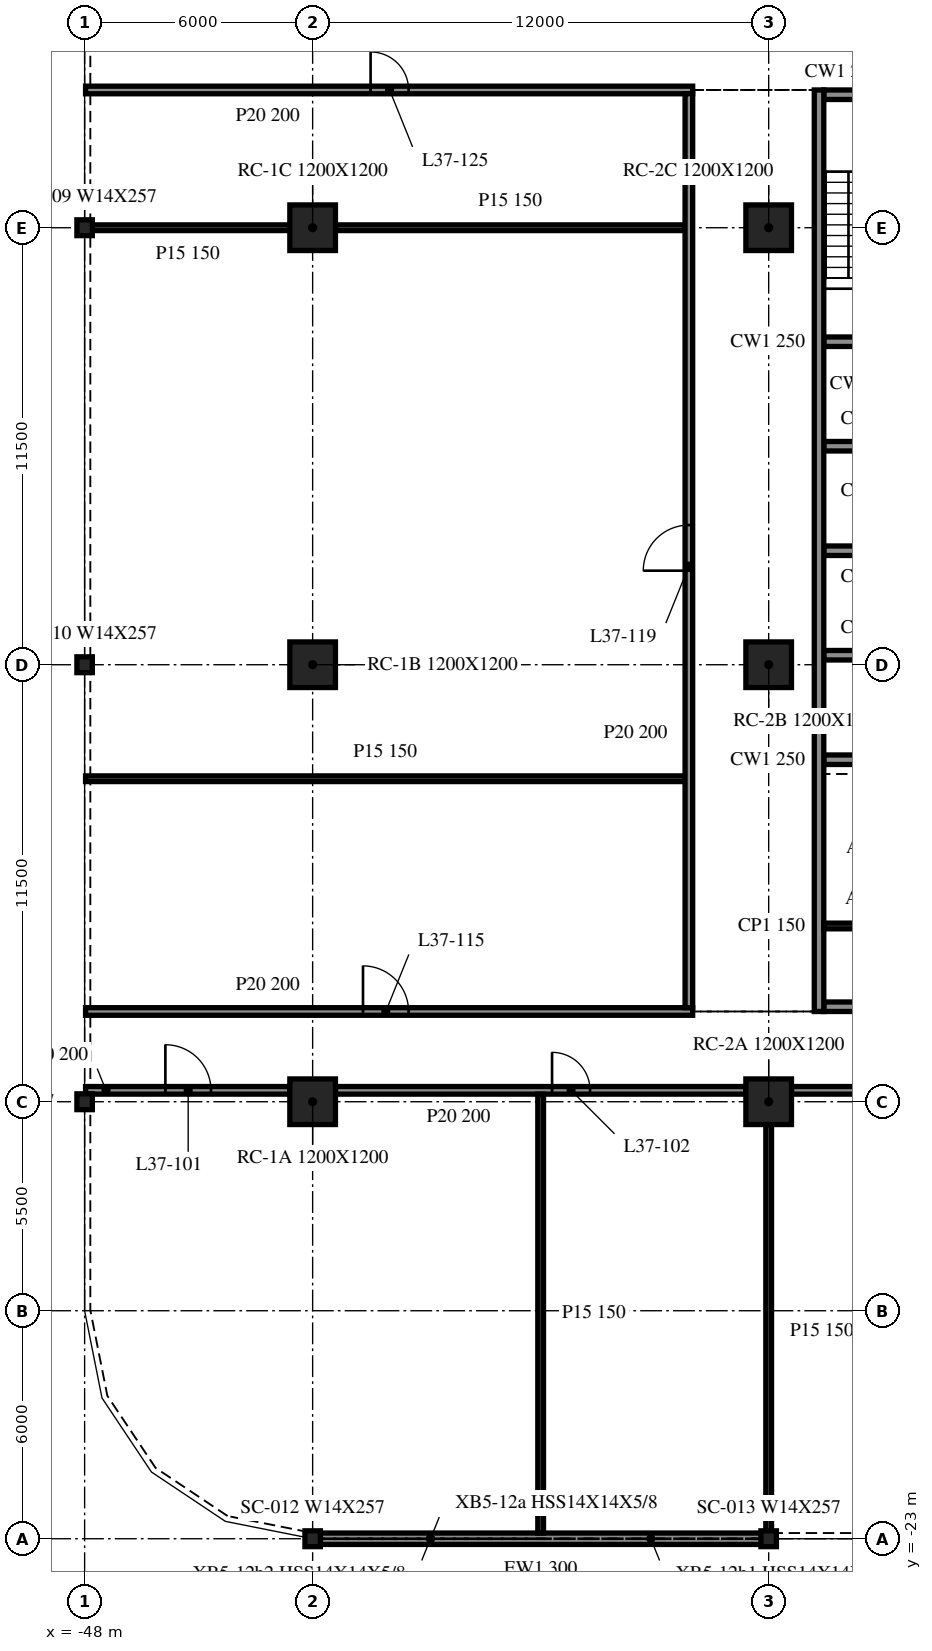
"""IFC4 building model, lengths in metres.
Left out: names, types, materials, properties, quantities, classifications, styles, units other than length and angle.
Written with IfcOpenShell. Run it as: python <this file> out.ifc"""

import sys

from ifc_helpers import new_model, si_unit, direction, frame, frame_2d, origin, origin_2d, place, context, subcontext, project, spatial, rectangle, i_section, extrude, element, fill, save


model = new_model("IFC4")
c1 = context("Model", 3, precision=1e-05, world=origin(), true_north=direction((0.0, 1.0)))
c2 = subcontext(c1, "Body", "Model", "MODEL_VIEW")
j1 = project(units=[si_unit("LENGTHUNIT", "METRE"), si_unit("PLANEANGLEUNIT", "RADIAN")], contexts=[c1])
p1 = place(None, origin())
s1 = spatial("IfcSite", under=j1, at=p1, CompositionType="ELEMENT")
p2 = place(p1, origin())
s2 = spatial("IfcBuilding", under=s1, at=p2, CompositionType="ELEMENT")
p3 = place(p2, frame((0.0, 0.0, 159.2)))
s3 = spatial("IfcBuildingStorey", under=s2, at=p3, CompositionType="ELEMENT", Elevation=159.2)
for number, where, z_axis, x_axis in (
    (1, (-42.0, -11.5, -0.34), (0.0, 0.0, 1.0), (1.0, 0.0, 0.0)),
    (2, (-42.0, 0.0, -0.34), (0.0, 0.0, 1.0), (1.0, 0.0, 0.0)),
    (3, (-42.0, 11.5, -0.34), (0.0, 0.0, 1.0), (1.0, 0.0, 0.0)),
    (4, (-30.0, -11.5, -0.34), (0.0, 0.0, 1.0), (1.0, 0.0, 0.0)),
    (5, (-30.0, 0.0, -0.34), (0.0, 0.0, 1.0), (1.0, 0.0, 0.0)),
    (6, (-30.0, 11.5, -0.34), (0.0, 0.0, 1.0), (1.0, 0.0, 0.0)),
):
    element("IfcColumn", number, at=place(p3, frame(where, z_axis=z_axis, x_axis=x_axis)), inside=s3, PredefinedType="COLUMN", context=c2, shape_type="SweptSolid", body=[
        extrude(rectangle(XDim=1.2, YDim=1.2, at=origin_2d()), origin(), (0.0, 0.0, 1.0), 3.8),
    ])
for number, where, z_axis, x_axis in (
    (7, (-48.0, 11.5, -0.34), (0.0, 0.0, 1.0), (1.0, 0.0, 0.0)),
    (8, (-48.0, 0.0, -0.34), (0.0, 0.0, 1.0), (1.0, 0.0, 0.0)),
    (9, (-48.0, -11.5, -0.34), (0.0, 0.0, 1.0), (1.0, 0.0, 0.0)),
    (10, (-42.0, -23.0, -0.34), (0.0, 0.0, 1.0), (1.0, 0.0, 0.0)),
    (11, (-30.0, -23.0, -0.34), (0.0, 0.0, 1.0), (1.0, 0.0, 0.0)),
):
    element("IfcColumn", number, at=place(p3, frame(where, z_axis=z_axis, x_axis=x_axis)), inside=s3, PredefinedType="COLUMN", context=c2, shape_type="SweptSolid", body=[
        extrude(i_section(OverallWidth=0.406, OverallDepth=0.417, WebThickness=0.03, FlangeThickness=0.048, at=origin_2d()), origin(), (0.0, 0.0, 1.0), 3.8),
    ])
p4 = place(p3, frame((-41.985, -23.0, 0.0), z_axis=(0.0, 0.0, 1.0), x_axis=(1.0, 0.0, 0.0)))
e12 = element("IfcWall", 12, at=p4, inside=s3, PredefinedType="NOTDEFINED", context=c2, shape_type="SweptSolid", body=[
    extrude(rectangle(XDim=11.97, YDim=0.3, at=frame_2d((5.985, 0.0))), origin(), (0.0, 0.0, 1.0), 2.782),
])
p5 = place(p3, frame((-28.675, 15.125, 0.0), z_axis=(0.0, 0.0, 1.0), x_axis=(0.0, -1.0, 0.0)))
e13 = element("IfcWall", 13, at=p5, inside=s3, PredefinedType="SOLIDWALL", context=c2, shape_type="SweptSolid", body=[
    extrude(rectangle(XDim=24.25, YDim=0.25, at=frame_2d((12.125, 0.0))), origin(), (0.0, 0.0, 1.0), 3.46),
])
p6 = place(p3, frame((-19.45, -9.0, 0.0), z_axis=(0.0, 0.0, 1.0), x_axis=(-1.0, 0.0, 0.0)))
e14 = element("IfcWall", 14, at=p6, inside=s3, PredefinedType="SOLIDWALL", context=c2, shape_type="SweptSolid", body=[
    extrude(rectangle(XDim=9.1, YDim=0.25, at=frame_2d((4.55, 0.0))), origin(), (0.0, 0.0, 1.0), 3.46),
])
p7 = place(p6, frame((3.65, 0.0, 0.0)))
e15 = element("IfcOpeningElement", 15, at=p7, cuts=e14, PredefinedType="OPENING", context=c2, shape_type="SweptSolid", body=[
    extrude(rectangle(XDim=1.8, YDim=2.1, at=frame_2d((0.9, 1.05))), frame((0.0, 0.135, 0.0), z_axis=(0.0, -1.0, 0.0), x_axis=(1.0, 0.0, 0.0)), (0.0, 0.0, 1.0), 0.27),
])
p8 = place(p3, frame((-28.55, 15.0, 0.0), z_axis=(0.0, 0.0, 1.0), x_axis=(1.0, 0.0, 0.0)))
e16 = element("IfcWall", 16, at=p8, inside=s3, PredefinedType="SOLIDWALL", context=c2, shape_type="SweptSolid", body=[
    extrude(rectangle(XDim=9.1, YDim=0.25, at=frame_2d((4.55, 0.0))), origin(), (0.0, 0.0, 1.0), 3.46),
])
p9 = place(p8, frame((3.65, 0.0, 0.0)))
e17 = element("IfcOpeningElement", 17, at=p9, cuts=e16, PredefinedType="OPENING", context=c2, shape_type="SweptSolid", body=[
    extrude(rectangle(XDim=1.8, YDim=2.1, at=frame_2d((0.9, 1.05))), frame((0.0, 0.135, 0.0), z_axis=(0.0, -1.0, 0.0), x_axis=(1.0, 0.0, 0.0)), (0.0, 0.0, 1.0), 0.27),
])
for number, where, z_axis, x_axis in (
    (18, (-28.55, -2.5, 0.0), (0.0, 0.0, 1.0), (1.0, 0.0, 0.0)),
    (19, (-28.55, 0.25, 0.0), (0.0, 0.0, 1.0), (1.0, 0.0, 0.0)),
    (20, (-28.55, 3.0, 0.0), (0.0, 0.0, 1.0), (1.0, 0.0, 0.0)),
    (21, (-28.55, 5.75, 0.0), (0.0, 0.0, 1.0), (1.0, 0.0, 0.0)),
    (22, (-28.55, 8.5, 0.0), (0.0, 0.0, 1.0), (1.0, 0.0, 0.0)),
):
    element("IfcWall", number, at=place(p3, frame(where, z_axis=z_axis, x_axis=x_axis)), inside=s3, PredefinedType="SOLIDWALL", context=c2, shape_type="SweptSolid", body=[
        extrude(rectangle(XDim=2.85, YDim=0.25, at=frame_2d((1.425, 0.0))), origin(), (0.0, 0.0, 1.0), 3.46),
    ])
p10 = place(p3, frame((-28.55, -6.875, 0.0), z_axis=(0.0, 0.0, 1.0), x_axis=(1.0, 0.0, 0.0)))
e23 = element("IfcWall", 23, at=p10, inside=s3, PredefinedType="PARTITIONING", context=c2, shape_type="SweptSolid", body=[
    extrude(rectangle(XDim=2.85, YDim=0.15, at=frame_2d((1.425, 0.0))), origin(), (0.0, 0.0, 1.0), 3.46),
])
p11 = place(p3, frame((-47.975, -11.2, 0.0), z_axis=(0.0, 0.0, 1.0), x_axis=(1.0, 0.0, 0.0)))
e24 = element("IfcWall", 24, at=p11, inside=s3, PredefinedType="PARTITIONING", context=c2, shape_type="SweptSolid", body=[
    extrude(rectangle(XDim=5.375, YDim=0.2, at=frame_2d((2.688, 0.0))), origin(), (0.0, 0.0, 1.0), 3.46),
])
p12 = place(p11, frame((2.1, 0.0, 0.0)))
e25 = element("IfcOpeningElement", 25, at=p12, cuts=e24, PredefinedType="OPENING", context=c2, shape_type="SweptSolid", body=[
    extrude(rectangle(XDim=1.2, YDim=2.1, at=frame_2d((0.6, 1.05))), frame((0.0, 0.11, 0.0), z_axis=(0.0, -1.0, 0.0), x_axis=(1.0, 0.0, 0.0)), (0.0, 0.0, 1.0), 0.22),
])
p13 = place(p3, frame((-41.4, -11.2, 0.0), z_axis=(0.0, 0.0, 1.0), x_axis=(1.0, 0.0, 0.0)))
e26 = element("IfcWall", 26, at=p13, inside=s3, PredefinedType="PARTITIONING", context=c2, shape_type="SweptSolid", body=[
    extrude(rectangle(XDim=10.8, YDim=0.2, at=frame_2d((5.4, 0.0))), origin(), (0.0, 0.0, 1.0), 3.46),
])
p14 = place(p13, frame((5.7, 0.0, 0.0)))
e27 = element("IfcOpeningElement", 27, at=p14, cuts=e26, PredefinedType="OPENING", context=c2, shape_type="SweptSolid", body=[
    extrude(rectangle(XDim=1.0, YDim=2.1, at=frame_2d((0.5, 1.05))), frame((0.0, 0.11, 0.0), z_axis=(0.0, -1.0, 0.0), x_axis=(1.0, 0.0, 0.0)), (0.0, 0.0, 1.0), 0.22),
])
p15 = place(p3, frame((-29.4, -11.2, 0.0), z_axis=(0.0, 0.0, 1.0), x_axis=(1.0, 0.0, 0.0)))
e28 = element("IfcWall", 28, at=p15, inside=s3, PredefinedType="PARTITIONING", context=c2, shape_type="SweptSolid", body=[
    extrude(rectangle(XDim=10.8, YDim=0.2, at=frame_2d((5.4, 0.0))), origin(), (0.0, 0.0, 1.0), 3.46),
])
p16 = place(p15, frame((3.9, 0.0, 0.0)))
e29 = element("IfcOpeningElement", 29, at=p16, cuts=e28, PredefinedType="OPENING", context=c2, shape_type="SweptSolid", body=[
    extrude(rectangle(XDim=1.2, YDim=2.1, at=frame_2d((0.6, 1.05))), frame((0.0, 0.11, 0.0), z_axis=(0.0, -1.0, 0.0), x_axis=(1.0, 0.0, 0.0)), (0.0, 0.0, 1.0), 0.22),
])
p17 = place(p15, frame((5.7, 0.0, 0.0)))
e30 = element("IfcOpeningElement", 30, at=p17, cuts=e28, PredefinedType="OPENING", context=c2, shape_type="SweptSolid", body=[
    extrude(rectangle(XDim=1.2, YDim=2.1, at=frame_2d((0.6, 1.05))), frame((0.0, 0.11, 0.0), z_axis=(0.0, -1.0, 0.0), x_axis=(1.0, 0.0, 0.0)), (0.0, 0.0, 1.0), 0.22),
])
p18 = place(p15, frame((8.7, 0.0, 0.0)))
e31 = element("IfcOpeningElement", 31, at=p18, cuts=e28, PredefinedType="OPENING", context=c2, shape_type="SweptSolid", body=[
    extrude(rectangle(XDim=1.0, YDim=2.1, at=frame_2d((0.5, 1.05))), frame((0.0, 0.11, 0.0), z_axis=(0.0, -1.0, 0.0), x_axis=(1.0, 0.0, 0.0)), (0.0, 0.0, 1.0), 0.22),
])
p19 = place(p3, frame((-47.975, -9.125, 0.0), z_axis=(0.0, 0.0, 1.0), x_axis=(1.0, 0.0, 0.0)))
e32 = element("IfcWall", 32, at=p19, inside=s3, PredefinedType="PARTITIONING", context=c2, shape_type="SweptSolid", body=[
    extrude(rectangle(XDim=15.975, YDim=0.2, at=frame_2d((7.988, 0.0))), origin(), (0.0, 0.0, 1.0), 3.46),
])
p20 = place(p19, frame((7.3, 0.0, 0.0)))
e33 = element("IfcOpeningElement", 33, at=p20, cuts=e32, PredefinedType="OPENING", context=c2, shape_type="SweptSolid", body=[
    extrude(rectangle(XDim=1.2, YDim=2.1, at=frame_2d((0.6, 1.05))), frame((0.0, 0.11, 0.0), z_axis=(0.0, -1.0, 0.0), x_axis=(1.0, 0.0, 0.0)), (0.0, 0.0, 1.0), 0.22),
])
p21 = place(p3, frame((-47.975, -3.0, 0.0), z_axis=(0.0, 0.0, 1.0), x_axis=(1.0, 0.0, 0.0)))
e34 = element("IfcWall", 34, at=p21, inside=s3, PredefinedType="PARTITIONING", context=c2, shape_type="SweptSolid", body=[
    extrude(rectangle(XDim=15.775, YDim=0.15, at=frame_2d((7.888, 0.0))), origin(), (0.0, 0.0, 1.0), 3.46),
])
p22 = place(p3, frame((-47.975, 11.5, 0.0), z_axis=(0.0, 0.0, 1.0), x_axis=(1.0, 0.0, 0.0)))
e35 = element("IfcWall", 35, at=p22, inside=s3, PredefinedType="PARTITIONING", context=c2, shape_type="SweptSolid", body=[
    extrude(rectangle(XDim=5.375, YDim=0.15, at=frame_2d((2.688, 0.0))), origin(), (0.0, 0.0, 1.0), 3.46),
])
p23 = place(p3, frame((-41.4, 11.5, 0.0), z_axis=(0.0, 0.0, 1.0), x_axis=(1.0, 0.0, 0.0)))
e36 = element("IfcWall", 36, at=p23, inside=s3, PredefinedType="PARTITIONING", context=c2, shape_type="SweptSolid", body=[
    extrude(rectangle(XDim=9.2, YDim=0.15, at=frame_2d((4.6, 0.0))), origin(), (0.0, 0.0, 1.0), 3.46),
])
p24 = place(p3, frame((-47.975, 15.125, 0.0), z_axis=(0.0, 0.0, 1.0), x_axis=(1.0, 0.0, 0.0)))
e37 = element("IfcWall", 37, at=p24, inside=s3, PredefinedType="PARTITIONING", context=c2, shape_type="SweptSolid", body=[
    extrude(rectangle(XDim=15.975, YDim=0.2, at=frame_2d((7.988, 0.0))), origin(), (0.0, 0.0, 1.0), 3.46),
])
p25 = place(p24, frame((7.5, 0.0, 0.0)))
e38 = element("IfcOpeningElement", 38, at=p25, cuts=e37, PredefinedType="OPENING", context=c2, shape_type="SweptSolid", body=[
    extrude(rectangle(XDim=1.0, YDim=2.1, at=frame_2d((0.5, 1.05))), frame((0.0, 0.11, 0.0), z_axis=(0.0, -1.0, 0.0), x_axis=(1.0, 0.0, 0.0)), (0.0, 0.0, 1.0), 0.22),
])
p26 = place(p3, frame((-36.0, -22.85, 0.0), z_axis=(0.0, 0.0, 1.0), x_axis=(0.0, 1.0, 0.0)))
e39 = element("IfcWall", 39, at=p26, inside=s3, PredefinedType="PARTITIONING", context=c2, shape_type="SweptSolid", body=[
    extrude(rectangle(XDim=11.55, YDim=0.15, at=frame_2d((5.775, 0.0))), origin(), (0.0, 0.0, 1.0), 3.46),
])
p27 = place(p3, frame((-32.1, -9.025, 0.0), z_axis=(0.0, 0.0, 1.0), x_axis=(0.0, 1.0, 0.0)))
e40 = element("IfcWall", 40, at=p27, inside=s3, PredefinedType="PARTITIONING", context=c2, shape_type="SweptSolid", body=[
    extrude(rectangle(XDim=24.05, YDim=0.2, at=frame_2d((12.025, 0.0))), origin(), (0.0, 0.0, 1.0), 3.46),
])
p28 = place(p27, frame((11.5, 0.0, 0.0)))
e41 = element("IfcOpeningElement", 41, at=p28, cuts=e40, PredefinedType="OPENING", context=c2, shape_type="SweptSolid", body=[
    extrude(rectangle(XDim=1.2, YDim=2.1, at=frame_2d((0.6, 1.05))), frame((0.0, 0.11, 0.0), z_axis=(0.0, -1.0, 0.0), x_axis=(1.0, 0.0, 0.0)), (0.0, 0.0, 1.0), 0.22),
])
p29 = place(p3, frame((-30.0, -22.975, 0.0), z_axis=(0.0, 0.0, 1.0), x_axis=(0.0, 1.0, 0.0)))
e42 = element("IfcWall", 42, at=p29, inside=s3, PredefinedType="PARTITIONING", context=c2, shape_type="SweptSolid", body=[
    extrude(rectangle(XDim=10.875, YDim=0.15, at=frame_2d((5.438, 0.0))), origin(), (0.0, 0.0, 1.0), 3.46),
])
p30 = place(p12, origin())
e43 = element("IfcDoor", 43, at=p30, inside=s3, OperationType="SINGLE_SWING_LEFT", PredefinedType="DOOR", context=c2, shape_type="SweptSolid", body=[
    extrude(rectangle(XDim=1.2, YDim=2.1, at=frame_2d((0.6, 1.05))), frame((0.0, 0.025, 0.0), z_axis=(0.0, -1.0, 0.0), x_axis=(1.0, 0.0, 0.0)), (0.0, 0.0, 1.0), 0.05),
])
fill(e25, e43)
p31 = place(p14, origin())
e44 = element("IfcDoor", 44, at=p31, inside=s3, OperationType="SINGLE_SWING_LEFT", PredefinedType="DOOR", context=c2, shape_type="SweptSolid", body=[
    extrude(rectangle(XDim=1.0, YDim=2.1, at=frame_2d((0.5, 1.05))), frame((0.0, 0.025, 0.0), z_axis=(0.0, -1.0, 0.0), x_axis=(1.0, 0.0, 0.0)), (0.0, 0.0, 1.0), 0.05),
])
fill(e27, e44)
p32 = place(p20, origin())
e45 = element("IfcDoor", 45, at=p32, inside=s3, OperationType="SINGLE_SWING_LEFT", PredefinedType="DOOR", context=c2, shape_type="SweptSolid", body=[
    extrude(rectangle(XDim=1.2, YDim=2.1, at=frame_2d((0.6, 1.05))), frame((0.0, 0.025, 0.0), z_axis=(0.0, -1.0, 0.0), x_axis=(1.0, 0.0, 0.0)), (0.0, 0.0, 1.0), 0.05),
])
fill(e33, e45)
p33 = place(p28, origin())
e46 = element("IfcDoor", 46, at=p33, inside=s3, OperationType="SINGLE_SWING_RIGHT", PredefinedType="DOOR", context=c2, shape_type="SweptSolid", body=[
    extrude(rectangle(XDim=1.2, YDim=2.1, at=frame_2d((0.6, 1.05))), frame((0.0, 0.025, 0.0), z_axis=(0.0, -1.0, 0.0), x_axis=(1.0, 0.0, 0.0)), (0.0, 0.0, 1.0), 0.05),
])
fill(e41, e46)
p34 = place(p25, origin())
e47 = element("IfcDoor", 47, at=p34, inside=s3, OperationType="SINGLE_SWING_LEFT", PredefinedType="DOOR", context=c2, shape_type="SweptSolid", body=[
    extrude(rectangle(XDim=1.0, YDim=2.1, at=frame_2d((0.5, 1.05))), frame((0.0, 0.025, 0.0), z_axis=(0.0, -1.0, 0.0), x_axis=(1.0, 0.0, 0.0)), (0.0, 0.0, 1.0), 0.05),
])
fill(e38, e47)
save(model, sys.argv[1])
